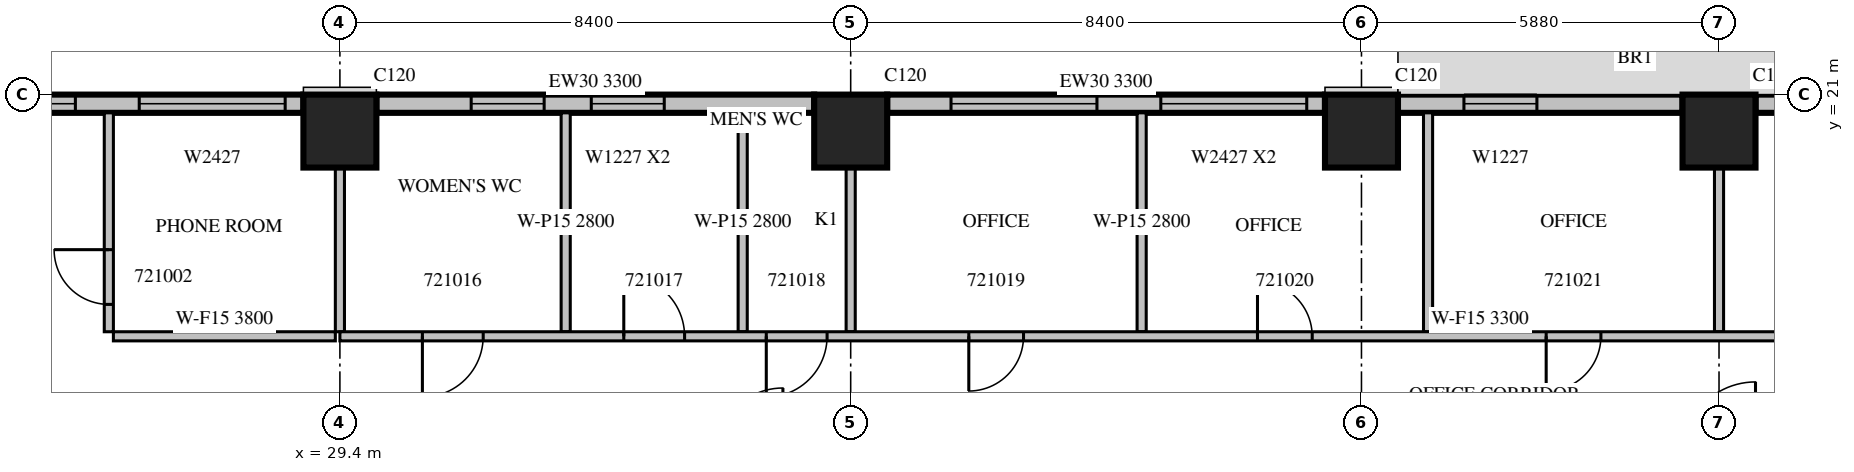
"""IFC4 building model, lengths in metres.
Left out: names, types, materials, properties, quantities, classifications, styles, units other than length and angle.
Written with IfcOpenShell. Run it as: python <this file> out.ifc"""

import sys

from ifc_helpers import new_model, si_unit, direction, frame, frame_2d, origin, origin_2d, place, context, subcontext, project, spatial, rectangle, extrude, source, transform, mapped, element, fill, save


model = new_model("IFC4")
c1 = context("Model", 3, precision=1e-05, world=origin(), true_north=direction((0.0, 1.0)))
c2 = subcontext(c1, "Body", "Model", "MODEL_VIEW")
j1 = project(units=[si_unit("LENGTHUNIT", "METRE"), si_unit("PLANEANGLEUNIT", "RADIAN")], contexts=[c1])
p1 = place(None, origin())
s1 = spatial("IfcSite", under=j1, at=p1, CompositionType="ELEMENT")
p2 = place(p1, origin())
s2 = spatial("IfcBuilding", under=s1, at=p2, CompositionType="ELEMENT")
p3 = place(p2, frame((0.0, 0.0, 99.3)))
s3 = spatial("IfcBuildingStorey", under=s2, at=p3, CompositionType="ELEMENT", Elevation=99.3)
m1 = source(origin(), c2, "Body", "SweptSolid", [
    extrude(rectangle(XDim=1.2, YDim=1.2, at=origin_2d()), origin(), (0.0, 0.0, 1.0), 4.2),
])
for number, where, z_axis, x_axis in (
    (1, (29.4, 20.4, 0.0), (0.0, 0.0, 1.0), (1.0, 0.0, 0.0)),
    (2, (37.8, 20.4, 0.0), (0.0, 0.0, 1.0), (1.0, 0.0, 0.0)),
    (3, (46.2, 20.4, 0.0), (0.0, 0.0, 1.0), (1.0, 0.0, 0.0)),
    (4, (52.08, 20.4, 0.0), (0.0, 0.0, 1.0), (1.0, 0.0, 0.0)),
):
    element("IfcColumn", number, at=place(p3, frame(where, z_axis=z_axis, x_axis=x_axis)), inside=s3, PredefinedType="COLUMN", context=c2, shape_type="MappedRepresentation", body=[
        mapped(m1, transform((0.0, 0.0, 0.0), scale=1.0)),
    ])
m2 = source(origin(), c2, "Body", "SweptSolid", [
    extrude(rectangle(XDim=4.68, YDim=0.3, at=frame_2d((2.34, 0.0))), origin(), (0.0, 0.0, 1.0), 3.8),
])
p4 = place(p3, frame((57.36, 20.85, 0.0), z_axis=(0.0, 0.0, 1.0), x_axis=(-1.0, 0.0, 0.0)))
e5 = element("IfcWall", 5, at=p4, inside=s3, PredefinedType="STANDARD", context=c2, shape_type="MappedRepresentation", body=[
    mapped(m2, transform((0.0, 0.0, 0.0), scale=1.0)),
])
m3 = source(origin(), c2, "Body", "SweptSolid", [
    extrude(rectangle(XDim=3.6, YDim=2.7, at=frame_2d((1.8, 1.35))), frame((0.0, 0.16, 0.0), z_axis=(0.0, -1.0, 0.0), x_axis=(1.0, 0.0, 0.0)), (0.0, 0.0, 1.0), 0.32),
])
p5 = place(p4, frame((0.54, 0.0, 0.6)))
e6 = element("IfcOpeningElement", 6, at=p5, cuts=e5, PredefinedType="OPENING", context=c2, shape_type="MappedRepresentation", body=[
    mapped(m3, transform((0.0, 0.0, 0.0), scale=1.0)),
])
p6 = place(p3, frame((51.48, 20.85, 0.0), z_axis=(0.0, 0.0, 1.0), x_axis=(-1.0, 0.0, 0.0)))
e7 = element("IfcWall", 7, at=p6, inside=s3, PredefinedType="STANDARD", context=c2, shape_type="MappedRepresentation", body=[
    mapped(m2, transform((0.0, 0.0, 0.0), scale=1.0)),
])
m4 = source(origin(), c2, "Body", "SweptSolid", [
    extrude(rectangle(XDim=1.2, YDim=2.7, at=frame_2d((0.6, 1.35))), frame((0.0, 0.16, 0.0), z_axis=(0.0, -1.0, 0.0), x_axis=(1.0, 0.0, 0.0)), (0.0, 0.0, 1.0), 0.32),
])
p7 = place(p6, frame((2.395, 0.0, 0.6)))
e8 = element("IfcOpeningElement", 8, at=p7, cuts=e7, PredefinedType="OPENING", context=c2, shape_type="MappedRepresentation", body=[
    mapped(m4, transform((0.0, 0.0, 0.0), scale=1.0)),
])
m5 = source(origin(), c2, "Body", "SweptSolid", [
    extrude(rectangle(XDim=7.2, YDim=0.3, at=frame_2d((3.6, 0.0))), origin(), (0.0, 0.0, 1.0), 3.3),
])
p8 = place(p3, frame((45.6, 20.85, 0.0), z_axis=(0.0, 0.0, 1.0), x_axis=(-1.0, 0.0, 0.0)))
e9 = element("IfcWall", 9, at=p8, inside=s3, PredefinedType="STANDARD", context=c2, shape_type="MappedRepresentation", body=[
    mapped(m5, transform((0.0, 0.0, 0.0), scale=1.0)),
])
m6 = source(origin(), c2, "Body", "SweptSolid", [
    extrude(rectangle(XDim=2.4, YDim=2.7, at=frame_2d((1.2, 1.35))), frame((0.0, 0.16, 0.0), z_axis=(0.0, -1.0, 0.0), x_axis=(1.0, 0.0, 0.0)), (0.0, 0.0, 1.0), 0.32),
])
p9 = place(p8, frame((0.3, 0.0, 0.6)))
e10 = element("IfcOpeningElement", 10, at=p9, cuts=e9, PredefinedType="OPENING", context=c2, shape_type="MappedRepresentation", body=[
    mapped(m6, transform((0.0, 0.0, 0.0), scale=1.0)),
])
p10 = place(p8, frame((3.75, 0.0, 0.6)))
e11 = element("IfcOpeningElement", 11, at=p10, cuts=e9, PredefinedType="OPENING", context=c2, shape_type="MappedRepresentation", body=[
    mapped(m6, transform((0.0, 0.0, 0.0), scale=1.0)),
])
p11 = place(p3, frame((37.2, 20.85, 0.0), z_axis=(0.0, 0.0, 1.0), x_axis=(-1.0, 0.0, 0.0)))
e12 = element("IfcWall", 12, at=p11, inside=s3, PredefinedType="STANDARD", context=c2, shape_type="MappedRepresentation", body=[
    mapped(m5, transform((0.0, 0.0, 0.0), scale=1.0)),
])
p12 = place(p11, frame((2.466, 0.0, 0.6)))
e13 = element("IfcOpeningElement", 13, at=p12, cuts=e12, PredefinedType="OPENING", context=c2, shape_type="MappedRepresentation", body=[
    mapped(m4, transform((0.0, 0.0, 0.0), scale=1.0)),
])
p13 = place(p11, frame((4.441, 0.0, 0.6)))
e14 = element("IfcOpeningElement", 14, at=p13, cuts=e12, PredefinedType="OPENING", context=c2, shape_type="MappedRepresentation", body=[
    mapped(m4, transform((0.0, 0.0, 0.0), scale=1.0)),
])
m7 = source(origin(), c2, "Body", "SweptSolid", [
    extrude(rectangle(XDim=6.6, YDim=0.3, at=frame_2d((3.3, 0.0))), origin(), (0.0, 0.0, 1.0), 3.8),
])
p14 = place(p3, frame((28.8, 20.85, 0.0), z_axis=(0.0, 0.0, 1.0), x_axis=(-1.0, 0.0, 0.0)))
e15 = element("IfcWall", 15, at=p14, inside=s3, PredefinedType="STANDARD", context=c2, shape_type="MappedRepresentation", body=[
    mapped(m7, transform((0.0, 0.0, 0.0), scale=1.0)),
])
p15 = place(p14, frame((0.3, 0.0, 0.6)))
e16 = element("IfcOpeningElement", 16, at=p15, cuts=e15, PredefinedType="OPENING", context=c2, shape_type="MappedRepresentation", body=[
    mapped(m6, transform((0.0, 0.0, 0.0), scale=1.0)),
])
m8 = source(origin(), c2, "Body", "SweptSolid", [
    extrude(rectangle(XDim=1.8, YDim=2.7, at=frame_2d((0.9, 1.35))), frame((0.0, 0.16, 0.0), z_axis=(0.0, -1.0, 0.0), x_axis=(1.0, 0.0, 0.0)), (0.0, 0.0, 1.0), 0.32),
])
p16 = place(p14, frame((3.75, 0.0, 0.6)))
e17 = element("IfcOpeningElement", 17, at=p16, cuts=e15, PredefinedType="OPENING", context=c2, shape_type="MappedRepresentation", body=[
    mapped(m8, transform((0.0, 0.0, 0.0), scale=1.0)),
])
m9 = source(origin(), c2, "Body", "SweptSolid", [
    extrude(rectangle(XDim=3.6, YDim=0.15, at=frame_2d((1.8, 0.0))), origin(), (0.0, 0.0, 1.0), 3.8),
])
p17 = place(p3, frame((25.6, 20.7, 0.0), z_axis=(0.0, 0.0, 1.0), x_axis=(0.0, -1.0, 0.0)))
e18 = element("IfcWall", 18, at=p17, inside=s3, PredefinedType="PARTITIONING", context=c2, shape_type="MappedRepresentation", body=[
    mapped(m9, transform((0.0, 0.0, 0.0), scale=1.0)),
])
m10 = source(origin(), c2, "Body", "SweptSolid", [
    extrude(rectangle(XDim=0.9, YDim=2.1, at=frame_2d((0.45, 1.05))), frame((0.0, 0.085, 0.0), z_axis=(0.0, -1.0, 0.0), x_axis=(1.0, 0.0, 0.0)), (0.0, 0.0, 1.0), 0.17),
])
p18 = place(p17, frame((2.25, 0.0, 0.0)))
e19 = element("IfcOpeningElement", 19, at=p18, cuts=e18, PredefinedType="OPENING", context=c2, shape_type="MappedRepresentation", body=[
    mapped(m10, transform((0.0, 0.0, 0.0), scale=1.0)),
])
m11 = source(origin(), c2, "Body", "SweptSolid", [
    extrude(rectangle(XDim=3.65, YDim=0.15, at=frame_2d((1.825, 0.0))), origin(), (0.0, 0.0, 1.0), 3.8),
])
p19 = place(p3, frame((25.675, 17.025, 0.0), z_axis=(0.0, 0.0, 1.0), x_axis=(1.0, 0.0, 0.0)))
e20 = element("IfcWall", 20, at=p19, inside=s3, PredefinedType="PARTITIONING", context=c2, shape_type="MappedRepresentation", body=[
    mapped(m11, transform((0.0, 0.0, 0.0), scale=1.0)),
])
m12 = source(origin(), c2, "Body", "SweptSolid", [
    extrude(rectangle(XDim=2.701, YDim=0.15, at=frame_2d((1.351, 0.0))), origin(), (0.0, 0.0, 1.0), 3.8),
])
p20 = place(p3, frame((29.4, 17.1, 0.0), z_axis=(0.0, 0.0, 1.0), x_axis=(0.0, 1.0, 0.0)))
e21 = element("IfcWall", 21, at=p20, inside=s3, PredefinedType="PARTITIONING", context=c2, shape_type="MappedRepresentation", body=[
    mapped(m12, transform((0.0, 0.0, 0.0), scale=1.0)),
])
m13 = source(origin(), c2, "Body", "SweptSolid", [
    extrude(rectangle(XDim=3.6, YDim=0.15, at=frame_2d((1.8, 0.0))), origin(), (0.0, 0.0, 1.0), 2.8),
])
for number, where, z_axis, x_axis in (
    (22, (33.113, 20.7, 0.0), (0.0, 0.0, 1.0), (0.0, -1.0, 0.0)),
    (23, (36.024, 20.7, 0.0), (0.0, 0.0, 1.0), (0.0, -1.0, 0.0)),
    (24, (42.585, 20.7, 0.0), (0.0, 0.0, 1.0), (0.0, -1.0, 0.0)),
):
    element("IfcWall", number, at=place(p3, frame(where, z_axis=z_axis, x_axis=x_axis)), inside=s3, PredefinedType="PARTITIONING", context=c2, shape_type="MappedRepresentation", body=[
        mapped(m13, transform((0.0, 0.0, 0.0), scale=1.0)),
    ])
p21 = place(p3, frame((47.295, 20.7, 0.0), z_axis=(0.0, 0.0, 1.0), x_axis=(0.0, -1.0, 0.0)))
e25 = element("IfcWall", 25, at=p21, inside=s3, PredefinedType="PARTITIONING", context=c2, shape_type="MappedRepresentation", body=[
    mapped(m9, transform((0.0, 0.0, 0.0), scale=1.0)),
])
for number, where, z_axis, x_axis in (
    (26, (37.8, 17.1, 0.0), (0.0, 0.0, 1.0), (0.0, 1.0, 0.0)),
    (27, (52.08, 17.1, 0.0), (0.0, 0.0, 1.0), (0.0, 1.0, 0.0)),
):
    element("IfcWall", number, at=place(p3, frame(where, z_axis=z_axis, x_axis=x_axis)), inside=s3, PredefinedType="PARTITIONING", context=c2, shape_type="MappedRepresentation", body=[
        mapped(m12, transform((0.0, 0.0, 0.0), scale=1.0)),
    ])
m14 = source(origin(), c2, "Body", "SweptSolid", [
    extrude(rectangle(XDim=37.5, YDim=0.15, at=frame_2d((18.75, 0.0))), origin(), (0.0, 0.0, 1.0), 3.3),
])
p22 = place(p3, frame((29.4, 17.025, 0.0), z_axis=(0.0, 0.0, 1.0), x_axis=(1.0, 0.0, 0.0)))
e28 = element("IfcWall", 28, at=p22, inside=s3, PredefinedType="PARTITIONING", context=c2, shape_type="MappedRepresentation", body=[
    mapped(m14, transform((0.0, 0.0, 0.0), scale=1.0)),
])
m15 = source(origin(), c2, "Body", "SweptSolid", [
    extrude(rectangle(XDim=1.0, YDim=2.1, at=frame_2d((0.5, 1.05))), frame((0.0, 0.085, 0.0), z_axis=(0.0, -1.0, 0.0), x_axis=(1.0, 0.0, 0.0)), (0.0, 0.0, 1.0), 0.17),
])
p23 = place(p22, frame((1.357, 0.0, 0.0)))
e29 = element("IfcOpeningElement", 29, at=p23, cuts=e28, PredefinedType="OPENING", context=c2, shape_type="MappedRepresentation", body=[
    mapped(m15, transform((0.0, 0.0, 0.0), scale=1.0)),
])
p24 = place(p22, frame((4.669, 0.0, 0.0)))
e30 = element("IfcOpeningElement", 30, at=p24, cuts=e28, PredefinedType="OPENING", context=c2, shape_type="MappedRepresentation", body=[
    mapped(m15, transform((0.0, 0.0, 0.0), scale=1.0)),
])
p25 = place(p22, frame((7.012, 0.0, 0.0)))
e31 = element("IfcOpeningElement", 31, at=p25, cuts=e28, PredefinedType="OPENING", context=c2, shape_type="MappedRepresentation", body=[
    mapped(m15, transform((0.0, 0.0, 0.0), scale=1.0)),
])
p26 = place(p22, frame((10.342, 0.0, 0.0)))
e32 = element("IfcOpeningElement", 32, at=p26, cuts=e28, PredefinedType="OPENING", context=c2, shape_type="MappedRepresentation", body=[
    mapped(m10, transform((0.0, 0.0, 0.0), scale=1.0)),
])
p27 = place(p22, frame((15.09, 0.0, 0.0)))
e33 = element("IfcOpeningElement", 33, at=p27, cuts=e28, PredefinedType="OPENING", context=c2, shape_type="MappedRepresentation", body=[
    mapped(m10, transform((0.0, 0.0, 0.0), scale=1.0)),
])
p28 = place(p22, frame((19.837, 0.0, 0.0)))
e34 = element("IfcOpeningElement", 34, at=p28, cuts=e28, PredefinedType="OPENING", context=c2, shape_type="MappedRepresentation", body=[
    mapped(m10, transform((0.0, 0.0, 0.0), scale=1.0)),
])
m16 = source(origin(), c2, "Body", "SweptSolid", [
    extrude(rectangle(XDim=1.2, YDim=2.1, at=frame_2d((0.6, 1.05))), frame((0.0, 0.085, 0.0), z_axis=(0.0, -1.0, 0.0), x_axis=(1.0, 0.0, 0.0)), (0.0, 0.0, 1.0), 0.17),
])
p29 = place(p22, frame((25.804, 0.0, 0.0)))
e35 = element("IfcOpeningElement", 35, at=p29, cuts=e28, PredefinedType="OPENING", context=c2, shape_type="MappedRepresentation", body=[
    mapped(m16, transform((0.0, 0.0, 0.0), scale=1.0)),
])
p30 = place(p22, frame((33.251, 0.0, 0.0)))
e36 = element("IfcOpeningElement", 36, at=p30, cuts=e28, PredefinedType="OPENING", context=c2, shape_type="MappedRepresentation", body=[
    mapped(m16, transform((0.0, 0.0, 0.0), scale=1.0)),
])
m17 = source(origin(), c2, "Body", "SweptSolid", [
    extrude(rectangle(XDim=1.2, YDim=2.7, at=frame_2d((0.6, 1.35))), frame((0.0, 0.03, 0.0), z_axis=(0.0, -1.0, 0.0), x_axis=(1.0, 0.0, 0.0)), (0.0, 0.0, 1.0), 0.06),
])
p31 = place(p7, origin())
e37 = element("IfcWindow", 37, at=p31, inside=s3, PartitioningType="SINGLE_PANEL", PredefinedType="WINDOW", context=c2, shape_type="MappedRepresentation", body=[
    mapped(m17, transform((0.0, 0.0, 0.0), scale=1.0)),
])
fill(e8, e37)
m18 = source(origin(), c2, "Body", "SweptSolid", [
    extrude(rectangle(XDim=2.4, YDim=2.7, at=frame_2d((1.2, 1.35))), frame((0.0, 0.03, 0.0), z_axis=(0.0, -1.0, 0.0), x_axis=(1.0, 0.0, 0.0)), (0.0, 0.0, 1.0), 0.06),
])
p32 = place(p9, origin())
e38 = element("IfcWindow", 38, at=p32, inside=s3, PartitioningType="SINGLE_PANEL", PredefinedType="WINDOW", context=c2, shape_type="MappedRepresentation", body=[
    mapped(m18, transform((0.0, 0.0, 0.0), scale=1.0)),
])
fill(e10, e38)
p33 = place(p12, origin())
e39 = element("IfcWindow", 39, at=p33, inside=s3, PartitioningType="SINGLE_PANEL", PredefinedType="WINDOW", context=c2, shape_type="MappedRepresentation", body=[
    mapped(m17, transform((0.0, 0.0, 0.0), scale=1.0)),
])
fill(e13, e39)
p34 = place(p13, origin())
e40 = element("IfcWindow", 40, at=p34, inside=s3, PartitioningType="SINGLE_PANEL", PredefinedType="WINDOW", context=c2, shape_type="MappedRepresentation", body=[
    mapped(m17, transform((0.0, 0.0, 0.0), scale=1.0)),
])
fill(e14, e40)
p35 = place(p15, origin())
e41 = element("IfcWindow", 41, at=p35, inside=s3, PartitioningType="SINGLE_PANEL", PredefinedType="WINDOW", context=c2, shape_type="MappedRepresentation", body=[
    mapped(m18, transform((0.0, 0.0, 0.0), scale=1.0)),
])
fill(e16, e41)
p36 = place(p10, origin())
e42 = element("IfcWindow", 42, at=p36, inside=s3, PartitioningType="SINGLE_PANEL", PredefinedType="WINDOW", context=c2, shape_type="MappedRepresentation", body=[
    mapped(m18, transform((0.0, 0.0, 0.0), scale=1.0)),
])
fill(e11, e42)
m19 = source(origin(), c2, "Body", "SweptSolid", [
    extrude(rectangle(XDim=1.8, YDim=2.7, at=frame_2d((0.9, 1.35))), frame((0.0, 0.03, 0.0), z_axis=(0.0, -1.0, 0.0), x_axis=(1.0, 0.0, 0.0)), (0.0, 0.0, 1.0), 0.06),
])
p37 = place(p16, origin())
e43 = element("IfcWindow", 43, at=p37, inside=s3, PartitioningType="SINGLE_PANEL", PredefinedType="WINDOW", context=c2, shape_type="MappedRepresentation", body=[
    mapped(m19, transform((0.0, 0.0, 0.0), scale=1.0)),
])
fill(e17, e43)
m20 = source(origin(), c2, "Body", "SweptSolid", [
    extrude(rectangle(XDim=0.9, YDim=2.1, at=frame_2d((0.45, 1.05))), frame((0.0, 0.025, 0.0), z_axis=(0.0, -1.0, 0.0), x_axis=(1.0, 0.0, 0.0)), (0.0, 0.0, 1.0), 0.05),
])
p38 = place(p18, origin())
e44 = element("IfcDoor", 44, at=p38, inside=s3, OperationType="SINGLE_SWING_RIGHT", PredefinedType="DOOR", context=c2, shape_type="MappedRepresentation", body=[
    mapped(m20, transform((0.0, 0.0, 0.0), scale=1.0)),
])
fill(e19, e44)
m21 = source(origin(), c2, "Body", "SweptSolid", [
    extrude(rectangle(XDim=1.0, YDim=2.1, at=frame_2d((0.5, 1.05))), frame((0.0, 0.025, 0.0), z_axis=(0.0, -1.0, 0.0), x_axis=(1.0, 0.0, 0.0)), (0.0, 0.0, 1.0), 0.05),
])
p39 = place(p23, origin())
e45 = element("IfcDoor", 45, at=p39, inside=s3, OperationType="SINGLE_SWING_RIGHT", PredefinedType="DOOR", context=c2, shape_type="MappedRepresentation", body=[
    mapped(m21, transform((0.0, 0.0, 0.0), scale=1.0)),
])
fill(e29, e45)
p40 = place(p24, origin())
e46 = element("IfcDoor", 46, at=p40, inside=s3, OperationType="SINGLE_SWING_LEFT", PredefinedType="DOOR", context=c2, shape_type="MappedRepresentation", body=[
    mapped(m21, transform((0.0, 0.0, 0.0), scale=1.0)),
])
fill(e30, e46)
p41 = place(p25, origin())
e47 = element("IfcDoor", 47, at=p41, inside=s3, OperationType="SINGLE_SWING_RIGHT", PredefinedType="DOOR", context=c2, shape_type="MappedRepresentation", body=[
    mapped(m21, transform((0.0, 0.0, 0.0), scale=1.0)),
])
fill(e31, e47)
p42 = place(p26, origin())
e48 = element("IfcDoor", 48, at=p42, inside=s3, OperationType="SINGLE_SWING_RIGHT", PredefinedType="DOOR", context=c2, shape_type="MappedRepresentation", body=[
    mapped(m20, transform((0.0, 0.0, 0.0), scale=1.0)),
])
fill(e32, e48)
p43 = place(p27, origin())
e49 = element("IfcDoor", 49, at=p43, inside=s3, OperationType="SINGLE_SWING_LEFT", PredefinedType="DOOR", context=c2, shape_type="MappedRepresentation", body=[
    mapped(m20, transform((0.0, 0.0, 0.0), scale=1.0)),
])
fill(e33, e49)
p44 = place(p28, origin())
e50 = element("IfcDoor", 50, at=p44, inside=s3, OperationType="SINGLE_SWING_RIGHT", PredefinedType="DOOR", context=c2, shape_type="MappedRepresentation", body=[
    mapped(m20, transform((0.0, 0.0, 0.0), scale=1.0)),
])
fill(e34, e50)
save(model, sys.argv[1])
